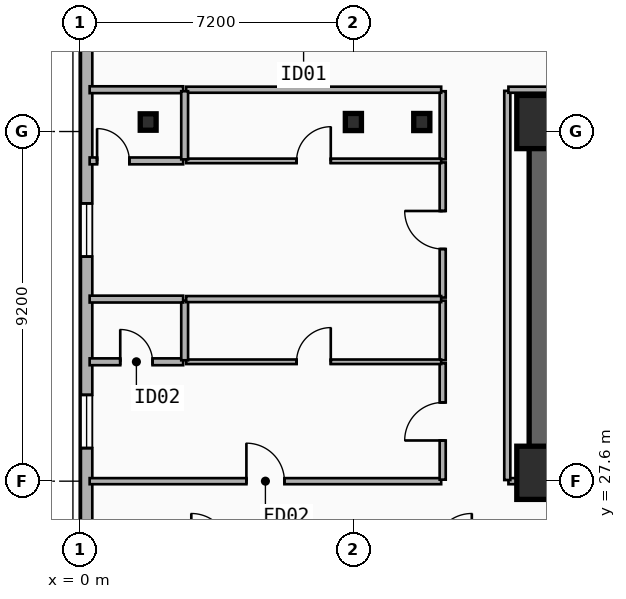
"""IFC4 building model, lengths in metres.
Left out: names, types, materials, properties, quantities, classifications, styles, units other than length and angle.
Written with IfcOpenShell. Run it as: python <this file> out.ifc"""

import sys

from ifc_helpers import new_model, si_unit, direction, frame, frame_2d, origin, origin_2d, place, context, subcontext, project, spatial, rectangle, i_section, extrude, element, fill, save


model = new_model("IFC4")
c1 = context("Model", 3, precision=1e-05, world=origin(), true_north=direction((0.0, 1.0)))
c2 = subcontext(c1, "Body", "Model", "MODEL_VIEW")
j1 = project(units=[si_unit("LENGTHUNIT", "METRE"), si_unit("PLANEANGLEUNIT", "RADIAN")], contexts=[c1])
p1 = place(None, origin())
s1 = spatial("IfcSite", under=j1, at=p1, CompositionType="ELEMENT")
p2 = place(p1, origin())
s2 = spatial("IfcBuilding", under=s1, at=p2, CompositionType="ELEMENT")
p3 = place(p2, frame((0.0, 0.0, 79.3)))
s3 = spatial("IfcBuildingStorey", under=s2, at=p3, CompositionType="ELEMENT", Elevation=79.3)
p4 = place(p3, frame((12.15, 37.05, 0.0), z_axis=(0.0, 0.0, 1.0), x_axis=(1.0, 0.0, 0.0)))
e1 = element("IfcWall", 1, at=p4, inside=s3, PredefinedType="SHEAR", context=c2, shape_type="SweptSolid", body=[
    extrude(rectangle(XDim=33.23, YDim=0.65, at=frame_2d((16.615, 0.0))), origin(), (0.0, 0.0, 1.0), 3.5),
])
p5 = place(p3, frame((21.18, 27.82, 0.0), z_axis=(0.0, 0.0, 1.0), x_axis=(-1.0, 0.0, 0.0)))
e2 = element("IfcWall", 2, at=p5, inside=s3, PredefinedType="SHEAR", context=c2, shape_type="SweptSolid", body=[
    extrude(rectangle(XDim=9.03, YDim=0.65, at=frame_2d((4.515, 0.0))), origin(), (0.0, 0.0, 1.0), 3.5),
])
p6 = place(p5, frame((2.68, 0.0, 0.0)))
e3 = element("IfcOpeningElement", 3, at=p6, cuts=e2, PredefinedType="OPENING", context=c2, shape_type="SweptSolid", body=[
    extrude(rectangle(XDim=1.1, YDim=2.15, at=frame_2d((0.55, 1.075))), frame((0.0, 0.335, 0.0), z_axis=(0.0, -1.0, 0.0), x_axis=(1.0, 0.0, 0.0)), (0.0, 0.0, 1.0), 0.67),
])
p7 = place(p3, frame((12.15, 28.145, 0.0), z_axis=(0.0, 0.0, 1.0), x_axis=(0.0, 1.0, 0.0)))
e4 = element("IfcWall", 4, at=p7, inside=s3, PredefinedType="SHEAR", context=c2, shape_type="SweptSolid", body=[
    extrude(rectangle(XDim=8.58, YDim=0.65, at=frame_2d((4.29, 0.0))), origin(), (0.0, 0.0, 1.0), 3.5),
])
for number, where, z_axis, x_axis in (
    (5, (12.2, 27.82, 0.0), (0.0, 0.0, 1.0), (1.0, 0.0, 0.0)),
    (6, (12.2, 37.05, 0.0), (0.0, 0.0, 1.0), (1.0, 0.0, 0.0)),
):
    element("IfcColumn", number, at=place(p3, frame(where, z_axis=z_axis, x_axis=x_axis)), inside=s3, PredefinedType="COLUMN", context=c2, shape_type="SweptSolid", body=[
        extrude(rectangle(XDim=1.4, YDim=1.4, at=origin_2d()), origin(), (0.0, 0.0, 1.0), 3.5),
    ])
p8 = place(p3, frame((9.0, 37.05, 0.0), z_axis=(0.0, 0.0, 1.0), x_axis=(1.0, 0.0, 0.0)))
e7 = element("IfcColumn", 7, at=p8, inside=s3, PredefinedType="COLUMN", context=c2, shape_type="SweptSolid", body=[
    extrude(i_section(OverallWidth=0.424, OverallDepth=0.45, WebThickness=0.041, FlangeThickness=0.065, FilletRadius=0.015, at=origin_2d()), origin(), (0.0, 0.0, 1.0), 3.5),
])
p9 = place(p3, frame((1.8, 37.05, 0.0), z_axis=(0.0, 0.0, 1.0), x_axis=(1.0, 0.0, 0.0)))
e8 = element("IfcColumn", 8, at=p9, inside=s3, PredefinedType="COLUMN", context=c2, shape_type="SweptSolid", body=[
    extrude(i_section(OverallWidth=0.418, OverallDepth=0.432, WebThickness=0.035, FlangeThickness=0.056, FilletRadius=0.015, at=origin_2d()), origin(), (0.0, 0.0, 1.0), 3.5),
])
p10 = place(p3, frame((7.2, 37.05, 0.0), z_axis=(0.0, 0.0, 1.0), x_axis=(1.0, 0.0, 0.0)))
e9 = element("IfcColumn", 9, at=p10, inside=s3, PredefinedType="COLUMN", context=c2, shape_type="SweptSolid", body=[
    extrude(i_section(OverallWidth=0.424, OverallDepth=0.45, WebThickness=0.041, FlangeThickness=0.065, FilletRadius=0.015, at=origin_2d()), origin(), (0.0, 0.0, 1.0), 3.5),
])
p11 = place(p3, frame((0.18, 21.0, 0.0), z_axis=(0.0, 0.0, 1.0), x_axis=(0.0, 1.0, 0.0)))
e10 = element("IfcWall", 10, at=p11, inside=s3, PredefinedType="SOLIDWALL", context=c2, shape_type="SweptSolid", body=[
    extrude(rectangle(XDim=18.0, YDim=0.3, at=frame_2d((9.0, 0.0))), origin(), (0.0, 0.0, 1.0), 3.24),
])
p12 = place(p11, frame((7.47, 0.0, 0.48)))
e11 = element("IfcOpeningElement", 11, at=p12, cuts=e10, PredefinedType="OPENING", context=c2, shape_type="SweptSolid", body=[
    extrude(rectangle(XDim=1.4, YDim=1.8, at=frame_2d((0.7, 0.9))), frame((0.0, 0.16, 0.0), z_axis=(0.0, -1.0, 0.0), x_axis=(1.0, 0.0, 0.0)), (0.0, 0.0, 1.0), 0.32),
])
p13 = place(p11, frame((12.509, 0.0, 0.48)))
e12 = element("IfcOpeningElement", 12, at=p13, cuts=e10, PredefinedType="OPENING", context=c2, shape_type="SweptSolid", body=[
    extrude(rectangle(XDim=1.4, YDim=1.8, at=frame_2d((0.7, 0.9))), frame((0.0, 0.16, 0.0), z_axis=(0.0, -1.0, 0.0), x_axis=(1.0, 0.0, 0.0)), (0.0, 0.0, 1.0), 0.32),
])
p14 = place(p11, frame((0.32, 0.0, 0.65)))
e13 = element("IfcOpeningElement", 13, at=p14, cuts=e10, PredefinedType="OPENING", context=c2, shape_type="SweptSolid", body=[
    extrude(rectangle(XDim=1.4, YDim=1.8, at=frame_2d((0.7, 0.9))), frame((0.0, 0.16, 0.0), z_axis=(0.0, -1.0, 0.0), x_axis=(1.0, 0.0, 0.0)), (0.0, 0.0, 1.0), 0.32),
])
p15 = place(p3, frame((0.26, 27.6, 0.0), z_axis=(0.0, 0.0, 1.0), x_axis=(1.0, 0.0, 0.0)))
e14 = element("IfcWall", 14, at=p15, inside=s3, PredefinedType="PARTITIONING", context=c2, shape_type="SweptSolid", body=[
    extrude(rectangle(XDim=9.25, YDim=0.16, at=frame_2d((4.625, 0.0))), origin(), (0.0, 0.0, 1.0), 2.57),
])
p16 = place(p15, frame((4.125, 0.0, 0.0)))
e15 = element("IfcOpeningElement", 15, at=p16, cuts=e14, PredefinedType="OPENING", context=c2, shape_type="SweptSolid", body=[
    extrude(rectangle(XDim=1.0, YDim=2.15, at=frame_2d((0.5, 1.075))), frame((0.0, 0.09, 0.0), z_axis=(0.0, -1.0, 0.0), x_axis=(1.0, 0.0, 0.0)), (0.0, 0.0, 1.0), 0.18),
])
p17 = place(p3, frame((9.55, 27.64, 0.0), z_axis=(0.0, 0.0, 1.0), x_axis=(0.0, 1.0, 0.0)))
e16 = element("IfcWall", 16, at=p17, inside=s3, PredefinedType="PARTITIONING", context=c2, shape_type="SweptSolid", body=[
    extrude(rectangle(XDim=3.061, YDim=0.16, at=frame_2d((1.531, 0.0))), origin(), (0.0, 0.0, 1.0), 3.24),
])
p18 = place(p17, frame((1.031, 0.0, 0.0)))
e17 = element("IfcOpeningElement", 17, at=p18, cuts=e16, PredefinedType="OPENING", context=c2, shape_type="SweptSolid", body=[
    extrude(rectangle(XDim=1.0, YDim=2.15, at=frame_2d((0.5, 1.075))), frame((0.0, 0.09, 0.0), z_axis=(0.0, -1.0, 0.0), x_axis=(1.0, 0.0, 0.0)), (0.0, 0.0, 1.0), 0.18),
])
p19 = place(p3, frame((9.55, 30.781, 0.0), z_axis=(0.0, 0.0, 1.0), x_axis=(0.0, 1.0, 0.0)))
e18 = element("IfcWall", 18, at=p19, inside=s3, PredefinedType="PARTITIONING", context=c2, shape_type="SweptSolid", body=[
    extrude(rectangle(XDim=1.57, YDim=0.16, at=frame_2d((0.785, 0.0))), origin(), (0.0, 0.0, 1.0), 3.24),
])
p20 = place(p3, frame((9.55, 32.431, 0.0), z_axis=(0.0, 0.0, 1.0), x_axis=(0.0, 1.0, 0.0)))
e19 = element("IfcWall", 19, at=p20, inside=s3, PredefinedType="PARTITIONING", context=c2, shape_type="SweptSolid", body=[
    extrude(rectangle(XDim=3.556, YDim=0.16, at=frame_2d((1.778, 0.0))), origin(), (0.0, 0.0, 1.0), 3.24),
])
p21 = place(p20, frame((1.278, 0.0, 0.0)))
e20 = element("IfcOpeningElement", 20, at=p21, cuts=e19, PredefinedType="OPENING", context=c2, shape_type="SweptSolid", body=[
    extrude(rectangle(XDim=1.0, YDim=2.15, at=frame_2d((0.5, 1.075))), frame((0.0, 0.09, 0.0), z_axis=(0.0, -1.0, 0.0), x_axis=(1.0, 0.0, 0.0)), (0.0, 0.0, 1.0), 0.18),
])
p22 = place(p3, frame((9.55, 36.067, 0.0), z_axis=(0.0, 0.0, 1.0), x_axis=(0.0, 1.0, 0.0)))
e21 = element("IfcWall", 21, at=p22, inside=s3, PredefinedType="PARTITIONING", context=c2, shape_type="SweptSolid", body=[
    extrude(rectangle(XDim=1.793, YDim=0.16, at=frame_2d((0.896, 0.0))), origin(), (0.0, 0.0, 1.0), 2.72),
])
p23 = place(p3, frame((0.26, 37.9, 0.0), z_axis=(0.0, 0.0, 1.0), x_axis=(1.0, 0.0, 0.0)))
e22 = element("IfcWall", 22, at=p23, inside=s3, PredefinedType="PLUMBINGWALL", context=c2, shape_type="SweptSolid", body=[
    extrude(rectangle(XDim=2.46, YDim=0.18, at=frame_2d((1.23, 0.0))), origin(), (0.0, 0.0, 1.0), 3.24),
])
p24 = place(p3, frame((2.8, 37.9, 0.0), z_axis=(0.0, 0.0, 1.0), x_axis=(1.0, 0.0, 0.0)))
e23 = element("IfcWall", 23, at=p24, inside=s3, PredefinedType="PARTITIONING", context=c2, shape_type="SweptSolid", body=[
    extrude(rectangle(XDim=6.71, YDim=0.16, at=frame_2d((3.355, 0.0))), origin(), (0.0, 0.0, 1.0), 3.24),
])
p25 = place(p3, frame((0.26, 30.741, 0.0), z_axis=(0.0, 0.0, 1.0), x_axis=(1.0, 0.0, 0.0)))
e24 = element("IfcWall", 24, at=p25, inside=s3, PredefinedType="PLUMBINGWALL", context=c2, shape_type="SweptSolid", body=[
    extrude(rectangle(XDim=2.46, YDim=0.18, at=frame_2d((1.23, 0.0))), origin(), (0.0, 0.0, 1.0), 2.57),
])
p26 = place(p25, frame((0.805, 0.0, 0.0)))
e25 = element("IfcOpeningElement", 25, at=p26, cuts=e24, PredefinedType="OPENING", context=c2, shape_type="SweptSolid", body=[
    extrude(rectangle(XDim=0.85, YDim=2.1, at=frame_2d((0.425, 1.05))), frame((0.0, 0.1, 0.0), z_axis=(0.0, -1.0, 0.0), x_axis=(1.0, 0.0, 0.0)), (0.0, 0.0, 1.0), 0.2),
])
p27 = place(p3, frame((2.8, 30.741, 0.0), z_axis=(0.0, 0.0, 1.0), x_axis=(1.0, 0.0, 0.0)))
e26 = element("IfcWall", 26, at=p27, inside=s3, PredefinedType="PARTITIONING", context=c2, shape_type="SweptSolid", body=[
    extrude(rectangle(XDim=6.71, YDim=0.12, at=frame_2d((3.355, 0.0))), origin(), (0.0, 0.0, 1.0), 2.57),
])
p28 = place(p27, frame((2.905, 0.0, 0.0)))
e27 = element("IfcOpeningElement", 27, at=p28, cuts=e26, PredefinedType="OPENING", context=c2, shape_type="SweptSolid", body=[
    extrude(rectangle(XDim=0.9, YDim=2.1, at=frame_2d((0.45, 1.05))), frame((0.0, 0.07, 0.0), z_axis=(0.0, -1.0, 0.0), x_axis=(1.0, 0.0, 0.0)), (0.0, 0.0, 1.0), 0.14),
])
p29 = place(p3, frame((2.76, 30.781, 0.0), z_axis=(0.0, 0.0, 1.0), x_axis=(0.0, 1.0, 0.0)))
e28 = element("IfcWall", 28, at=p29, inside=s3, PredefinedType="PLUMBINGWALL", context=c2, shape_type="SweptSolid", body=[
    extrude(rectangle(XDim=1.57, YDim=0.18, at=frame_2d((0.785, 0.0))), origin(), (0.0, 0.0, 1.0), 3.24),
])
p30 = place(p3, frame((0.26, 32.391, 0.0), z_axis=(0.0, 0.0, 1.0), x_axis=(1.0, 0.0, 0.0)))
e29 = element("IfcWall", 29, at=p30, inside=s3, PredefinedType="PLUMBINGWALL", context=c2, shape_type="SweptSolid", body=[
    extrude(rectangle(XDim=2.46, YDim=0.18, at=frame_2d((1.23, 0.0))), origin(), (0.0, 0.0, 1.0), 2.57),
])
p31 = place(p3, frame((2.8, 32.391, 0.0), z_axis=(0.0, 0.0, 1.0), x_axis=(1.0, 0.0, 0.0)))
e30 = element("IfcWall", 30, at=p31, inside=s3, PredefinedType="PARTITIONING", context=c2, shape_type="SweptSolid", body=[
    extrude(rectangle(XDim=6.71, YDim=0.16, at=frame_2d((3.355, 0.0))), origin(), (0.0, 0.0, 1.0), 2.57),
])
p32 = place(p3, frame((0.26, 36.027, 0.0), z_axis=(0.0, 0.0, 1.0), x_axis=(1.0, 0.0, 0.0)))
e31 = element("IfcWall", 31, at=p32, inside=s3, PredefinedType="PLUMBINGWALL", context=c2, shape_type="SweptSolid", body=[
    extrude(rectangle(XDim=2.46, YDim=0.18, at=frame_2d((1.23, 0.0))), origin(), (0.0, 0.0, 1.0), 2.57),
])
p33 = place(p32, frame((0.195, 0.0, 0.0)))
e32 = element("IfcOpeningElement", 32, at=p33, cuts=e31, PredefinedType="OPENING", context=c2, shape_type="SweptSolid", body=[
    extrude(rectangle(XDim=0.85, YDim=2.1, at=frame_2d((0.425, 1.05))), frame((0.0, 0.1, 0.0), z_axis=(0.0, -1.0, 0.0), x_axis=(1.0, 0.0, 0.0)), (0.0, 0.0, 1.0), 0.2),
])
p34 = place(p3, frame((2.8, 36.027, 0.0), z_axis=(0.0, 0.0, 1.0), x_axis=(1.0, 0.0, 0.0)))
e33 = element("IfcWall", 33, at=p34, inside=s3, PredefinedType="PARTITIONING", context=c2, shape_type="SweptSolid", body=[
    extrude(rectangle(XDim=6.71, YDim=0.12, at=frame_2d((3.355, 0.0))), origin(), (0.0, 0.0, 1.0), 2.57),
])
p35 = place(p34, frame((2.905, 0.0, 0.0)))
e34 = element("IfcOpeningElement", 34, at=p35, cuts=e33, PredefinedType="OPENING", context=c2, shape_type="SweptSolid", body=[
    extrude(rectangle(XDim=0.9, YDim=2.1, at=frame_2d((0.45, 1.05))), frame((0.0, 0.07, 0.0), z_axis=(0.0, -1.0, 0.0), x_axis=(1.0, 0.0, 0.0)), (0.0, 0.0, 1.0), 0.14),
])
p36 = place(p3, frame((2.76, 36.067, 0.0), z_axis=(0.0, 0.0, 1.0), x_axis=(0.0, 1.0, 0.0)))
e35 = element("IfcWall", 35, at=p36, inside=s3, PredefinedType="PLUMBINGWALL", context=c2, shape_type="SweptSolid", body=[
    extrude(rectangle(XDim=1.793, YDim=0.18, at=frame_2d((0.896, 0.0))), origin(), (0.0, 0.0, 1.0), 2.72),
])
p37 = place(p3, frame((11.28, 27.6, 0.0), z_axis=(0.0, 0.0, 1.0), x_axis=(1.0, 0.0, 0.0)))
e36 = element("IfcWall", 36, at=p37, inside=s3, PredefinedType="PARTITIONING", context=c2, shape_type="SweptSolid", body=[
    extrude(rectangle(XDim=0.84, YDim=0.16, at=frame_2d((0.42, 0.0))), origin(), (0.0, 0.0, 1.0), 2.28),
])
p38 = place(p3, frame((11.25, 27.63, 0.0), z_axis=(0.0, 0.0, 1.0), x_axis=(0.0, 1.0, 0.0)))
e37 = element("IfcWall", 37, at=p38, inside=s3, PredefinedType="PARTITIONING", context=c2, shape_type="SweptSolid", body=[
    extrude(rectangle(XDim=10.24, YDim=0.16, at=frame_2d((5.12, 0.0))), origin(), (0.0, 0.0, 1.0), 2.72),
])
p39 = place(p3, frame((11.28, 37.9, 0.0), z_axis=(0.0, 0.0, 1.0), x_axis=(1.0, 0.0, 0.0)))
e38 = element("IfcWall", 38, at=p39, inside=s3, PredefinedType="PARTITIONING", context=c2, shape_type="SweptSolid", body=[
    extrude(rectangle(XDim=35.04, YDim=0.16, at=frame_2d((17.52, 0.0))), origin(), (0.0, 0.0, 1.0), 3.24),
])
p40 = place(p12, origin())
e39 = element("IfcWindow", 39, at=p40, inside=s3, PartitioningType="SINGLE_PANEL", PredefinedType="WINDOW", context=c2, shape_type="SweptSolid", body=[
    extrude(rectangle(XDim=1.4, YDim=1.8, at=frame_2d((0.7, 0.9))), frame((0.0, 0.03, 0.0), z_axis=(0.0, -1.0, 0.0), x_axis=(1.0, 0.0, 0.0)), (0.0, 0.0, 1.0), 0.06),
])
fill(e11, e39)
p41 = place(p13, origin())
e40 = element("IfcWindow", 40, at=p41, inside=s3, PartitioningType="SINGLE_PANEL", PredefinedType="WINDOW", context=c2, shape_type="SweptSolid", body=[
    extrude(rectangle(XDim=1.4, YDim=1.8, at=frame_2d((0.7, 0.9))), frame((0.0, 0.03, 0.0), z_axis=(0.0, -1.0, 0.0), x_axis=(1.0, 0.0, 0.0)), (0.0, 0.0, 1.0), 0.06),
])
fill(e12, e40)
p42 = place(p16, origin())
e41 = element("IfcDoor", 41, at=p42, inside=s3, OperationType="SINGLE_SWING_LEFT", PredefinedType="DOOR", context=c2, shape_type="SweptSolid", body=[
    extrude(rectangle(XDim=1.0, YDim=2.15, at=frame_2d((0.5, 1.075))), frame((0.0, 0.025, 0.0), z_axis=(0.0, -1.0, 0.0), x_axis=(1.0, 0.0, 0.0)), (0.0, 0.0, 1.0), 0.05),
])
fill(e15, e41)
p43 = place(p18, origin())
e42 = element("IfcDoor", 42, at=p43, inside=s3, OperationType="SINGLE_SWING_LEFT", PredefinedType="DOOR", context=c2, shape_type="SweptSolid", body=[
    extrude(rectangle(XDim=1.0, YDim=2.15, at=frame_2d((0.5, 1.075))), frame((0.0, 0.025, 0.0), z_axis=(0.0, -1.0, 0.0), x_axis=(1.0, 0.0, 0.0)), (0.0, 0.0, 1.0), 0.05),
])
fill(e17, e42)
p44 = place(p21, origin())
e43 = element("IfcDoor", 43, at=p44, inside=s3, OperationType="SINGLE_SWING_RIGHT", PredefinedType="DOOR", context=c2, shape_type="SweptSolid", body=[
    extrude(rectangle(XDim=1.0, YDim=2.15, at=frame_2d((0.5, 1.075))), frame((0.0, 0.025, 0.0), z_axis=(0.0, -1.0, 0.0), x_axis=(1.0, 0.0, 0.0)), (0.0, 0.0, 1.0), 0.05),
])
fill(e20, e43)
p45 = place(p26, origin())
e44 = element("IfcDoor", 44, at=p45, inside=s3, OperationType="SINGLE_SWING_LEFT", PredefinedType="DOOR", context=c2, shape_type="SweptSolid", body=[
    extrude(rectangle(XDim=0.85, YDim=2.1, at=frame_2d((0.425, 1.05))), frame((0.0, 0.025, 0.0), z_axis=(0.0, -1.0, 0.0), x_axis=(1.0, 0.0, 0.0)), (0.0, 0.0, 1.0), 0.05),
])
fill(e25, e44)
p46 = place(p28, origin())
e45 = element("IfcDoor", 45, at=p46, inside=s3, OperationType="SINGLE_SWING_RIGHT", PredefinedType="DOOR", context=c2, shape_type="SweptSolid", body=[
    extrude(rectangle(XDim=0.9, YDim=2.1, at=frame_2d((0.45, 1.05))), frame((0.0, 0.025, 0.0), z_axis=(0.0, -1.0, 0.0), x_axis=(1.0, 0.0, 0.0)), (0.0, 0.0, 1.0), 0.05),
])
fill(e27, e45)
p47 = place(p33, origin())
e46 = element("IfcDoor", 46, at=p47, inside=s3, OperationType="SINGLE_SWING_LEFT", PredefinedType="DOOR", context=c2, shape_type="SweptSolid", body=[
    extrude(rectangle(XDim=0.85, YDim=2.1, at=frame_2d((0.425, 1.05))), frame((0.0, 0.025, 0.0), z_axis=(0.0, -1.0, 0.0), x_axis=(1.0, 0.0, 0.0)), (0.0, 0.0, 1.0), 0.05),
])
fill(e32, e46)
p48 = place(p35, origin())
e47 = element("IfcDoor", 47, at=p48, inside=s3, OperationType="SINGLE_SWING_RIGHT", PredefinedType="DOOR", context=c2, shape_type="SweptSolid", body=[
    extrude(rectangle(XDim=0.9, YDim=2.1, at=frame_2d((0.45, 1.05))), frame((0.0, 0.025, 0.0), z_axis=(0.0, -1.0, 0.0), x_axis=(1.0, 0.0, 0.0)), (0.0, 0.0, 1.0), 0.05),
])
fill(e34, e47)
save(model, sys.argv[1])
